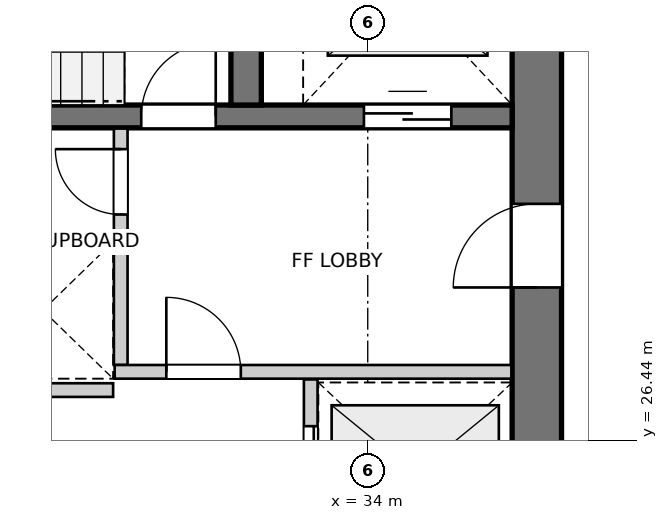
"""IFC4 building model, lengths in metres.
Left out: names, types, materials, properties, quantities, classifications, styles, units other than length and angle.
Written with IfcOpenShell. Run it as: python <this file> out.ifc"""

import sys

from ifc_helpers import new_model, si_unit, direction, frame, frame_2d, origin, place, context, subcontext, project, spatial, rectangle, extrude, source, transform, mapped, element, fill, save


model = new_model("IFC4")
c1 = context("Model", 3, precision=1e-05, world=origin(), true_north=direction((0.0, 1.0)))
c2 = subcontext(c1, "Body", "Model", "MODEL_VIEW")
j1 = project(units=[si_unit("LENGTHUNIT", "METRE"), si_unit("PLANEANGLEUNIT", "RADIAN")], contexts=[c1])
p1 = place(None, origin())
s1 = spatial("IfcSite", under=j1, at=p1, CompositionType="ELEMENT")
p2 = place(p1, origin())
s2 = spatial("IfcBuilding", under=s1, at=p2, CompositionType="ELEMENT")
p3 = place(p2, frame((0.0, 0.0, 80.0)))
s3 = spatial("IfcBuildingStorey", under=s2, at=p3, CompositionType="ELEMENT", Elevation=80.0)
p4 = place(p3, frame((36.225, 18.2, 0.0), z_axis=(0.0, 0.0, 1.0), x_axis=(0.0, 1.0, 0.0)))
e1 = element("IfcWall", 1, at=p4, inside=s3, PredefinedType="SHEAR", context=c2, shape_type="SweptSolid", body=[
    extrude(rectangle(XDim=15.6, YDim=0.65, at=frame_2d((7.8, 0.0))), origin(), (0.0, 0.0, 1.0), 2.935),
])
p5 = place(p4, frame((4.25, 0.0, 0.0)))
e2 = element("IfcOpeningElement", 2, at=p5, cuts=e1, PredefinedType="OPENING", context=c2, shape_type="SweptSolid", body=[
    extrude(rectangle(XDim=1.1, YDim=2.15, at=frame_2d((0.55, 1.075))), frame((0.0, 0.335, 0.0), z_axis=(0.0, -1.0, 0.0), x_axis=(1.0, 0.0, 0.0)), (0.0, 0.0, 1.0), 0.67),
])
p6 = place(p4, frame((10.25, 0.0, 0.0)))
e3 = element("IfcOpeningElement", 3, at=p6, cuts=e1, PredefinedType="OPENING", context=c2, shape_type="SweptSolid", body=[
    extrude(rectangle(XDim=1.1, YDim=2.15, at=frame_2d((0.55, 1.075))), frame((0.0, 0.335, 0.0), z_axis=(0.0, -1.0, 0.0), x_axis=(1.0, 0.0, 0.0)), (0.0, 0.0, 1.0), 0.67),
])
p7 = place(p3, frame((24.8, 30.7, 0.0), z_axis=(0.0, 0.0, 1.0), x_axis=(1.0, 0.0, 0.0)))
e4 = element("IfcWall", 4, at=p7, inside=s3, PredefinedType="SHEAR", context=c2, shape_type="SweptSolid", body=[
    extrude(rectangle(XDim=11.1, YDim=0.3, at=frame_2d((5.55, 0.0))), origin(), (0.0, 0.0, 1.0), 2.935),
])
p8 = place(p7, frame((6.22, 0.0, 0.0)))
e5 = element("IfcOpeningElement", 5, at=p8, cuts=e4, PredefinedType="OPENING", context=c2, shape_type="SweptSolid", body=[
    extrude(rectangle(XDim=0.98, YDim=2.15, at=frame_2d((0.49, 1.075))), frame((0.0, 0.16, 0.0), z_axis=(0.0, -1.0, 0.0), x_axis=(1.0, 0.0, 0.0)), (0.0, 0.0, 1.0), 0.32),
])
p9 = place(p7, frame((9.15, 0.0, 0.0)))
e6 = element("IfcOpeningElement", 6, at=p9, cuts=e4, PredefinedType="OPENING", context=c2, shape_type="SweptSolid", body=[
    extrude(rectangle(XDim=1.15, YDim=2.15, at=frame_2d((0.575, 1.075))), frame((0.0, 0.16, 0.0), z_axis=(0.0, -1.0, 0.0), x_axis=(1.0, 0.0, 0.0)), (0.0, 0.0, 1.0), 0.32),
])
p10 = place(p3, frame((32.4, 30.85, 0.0), z_axis=(0.0, 0.0, 1.0), x_axis=(0.0, 1.0, 0.0)))
e7 = element("IfcWall", 7, at=p10, inside=s3, PredefinedType="SHEAR", context=c2, shape_type="SweptSolid", body=[
    extrude(rectangle(XDim=2.95, YDim=0.4, at=frame_2d((1.475, 0.0))), origin(), (0.0, 0.0, 1.0), 2.935),
])
p11 = place(p3, frame((30.75, 27.43, 0.0), z_axis=(0.0, 0.0, 1.0), x_axis=(0.0, 1.0, 0.0)))
e8 = element("IfcWall", 8, at=p11, inside=s3, PredefinedType="PARTITIONING", context=c2, shape_type="SweptSolid", body=[
    extrude(rectangle(XDim=3.11, YDim=0.18, at=frame_2d((1.555, 0.0))), origin(), (0.0, 0.0, 1.0), 2.935),
])
p12 = place(p11, frame((1.98, 0.0, 0.0)))
e9 = element("IfcOpeningElement", 9, at=p12, cuts=e8, PredefinedType="OPENING", context=c2, shape_type="SweptSolid", body=[
    extrude(rectangle(XDim=0.86, YDim=2.05, at=frame_2d((0.43, 1.025))), frame((0.0, 0.1, 0.0), z_axis=(0.0, -1.0, 0.0), x_axis=(1.0, 0.0, 0.0)), (0.0, 0.0, 1.0), 0.2),
])
p13 = place(p3, frame((30.67, 27.34, 0.0), z_axis=(0.0, 0.0, 1.0), x_axis=(1.0, 0.0, 0.0)))
e10 = element("IfcWall", 10, at=p13, inside=s3, PredefinedType="PARTITIONING", context=c2, shape_type="SweptSolid", body=[
    extrude(rectangle(XDim=5.22, YDim=0.18, at=frame_2d((2.61, 0.0))), origin(), (0.0, 0.0, 1.0), 2.935),
])
p14 = place(p13, frame((0.68, 0.0, 0.0)))
e11 = element("IfcOpeningElement", 11, at=p14, cuts=e10, PredefinedType="OPENING", context=c2, shape_type="SweptSolid", body=[
    extrude(rectangle(XDim=0.98, YDim=2.15, at=frame_2d((0.49, 1.075))), frame((0.0, 0.1, 0.0), z_axis=(0.0, -1.0, 0.0), x_axis=(1.0, 0.0, 0.0)), (0.0, 0.0, 1.0), 0.2),
])
p15 = place(p3, frame((33.25, 24.76, 0.0), z_axis=(0.0, 0.0, 1.0), x_axis=(0.0, 1.0, 0.0)))
e12 = element("IfcWall", 12, at=p15, inside=s3, PredefinedType="PARTITIONING", context=c2, shape_type="SweptSolid", body=[
    extrude(rectangle(XDim=2.48, YDim=0.18, at=frame_2d((1.24, 0.0))), origin(), (0.0, 0.0, 1.0), 2.935),
])
p16 = place(p15, frame((0.615, 0.0, 0.0)))
e13 = element("IfcOpeningElement", 13, at=p16, cuts=e12, PredefinedType="OPENING", context=c2, shape_type="SweptSolid", body=[
    extrude(rectangle(XDim=1.25, YDim=2.15, at=frame_2d((0.625, 1.075))), frame((0.0, 0.1, 0.0), z_axis=(0.0, -1.0, 0.0), x_axis=(1.0, 0.0, 0.0)), (0.0, 0.0, 1.0), 0.2),
])
p17 = place(p3, frame((24.81, 29.08, 0.0), z_axis=(0.0, 0.0, 1.0), x_axis=(1.0, 0.0, 0.0)))
e14 = element("IfcWall", 14, at=p17, inside=s3, PredefinedType="PARTITIONING", context=c2, shape_type="SweptSolid", body=[
    extrude(rectangle(XDim=5.84, YDim=0.18, at=frame_2d((2.92, 0.0))), origin(), (0.0, 0.0, 1.0), 2.935),
])
p18 = place(p3, frame((28.825, 27.1, 0.0), z_axis=(0.0, 0.0, 1.0), x_axis=(1.0, 0.0, 0.0)))
e15 = element("IfcWall", 15, at=p18, inside=s3, PredefinedType="PARTITIONING", context=c2, shape_type="SweptSolid", body=[
    extrude(rectangle(XDim=1.825, YDim=0.18, at=frame_2d((0.913, 0.0))), origin(), (0.0, 0.0, 1.0), 2.935),
])
m1 = source(origin(), c2, "Body", "SweptSolid", [
    extrude(rectangle(XDim=0.98, YDim=2.15, at=frame_2d((0.49, 1.075))), frame((0.0, 0.025, 0.0), z_axis=(0.0, -1.0, 0.0), x_axis=(1.0, 0.0, 0.0)), (0.0, 0.0, 1.0), 0.05),
])
p19 = place(p8, origin())
e16 = element("IfcDoor", 16, at=p19, inside=s3, OperationType="SINGLE_SWING_RIGHT", PredefinedType="DOOR", context=c2, shape_type="MappedRepresentation", body=[
    mapped(m1, transform((0.0, 0.0, 0.0), x_axis=(1.0, 0.0, 0.0), y_axis=(0.0, 1.0, 0.0), z_axis=(0.0, 0.0, 1.0), scale=1.0)),
])
fill(e5, e16)
m2 = source(origin(), c2, "Body", "SweptSolid", [
    extrude(rectangle(XDim=1.15, YDim=2.15, at=frame_2d((0.575, 1.075))), frame((0.0, 0.025, 0.0), z_axis=(0.0, -1.0, 0.0), x_axis=(1.0, 0.0, 0.0)), (0.0, 0.0, 1.0), 0.05),
])
p20 = place(p9, origin())
e17 = element("IfcDoor", 17, at=p20, inside=s3, OperationType="DOUBLE_DOOR_SLIDING", PredefinedType="DOOR", context=c2, shape_type="MappedRepresentation", body=[
    mapped(m2, transform((0.0, 0.0, 0.0), x_axis=(1.0, 0.0, 0.0), y_axis=(0.0, 1.0, 0.0), z_axis=(0.0, 0.0, 1.0), scale=1.0)),
])
fill(e6, e17)
m3 = source(origin(), c2, "Body", "SweptSolid", [
    extrude(rectangle(XDim=1.1, YDim=2.15, at=frame_2d((0.55, 1.075))), frame((0.0, 0.025, 0.0), z_axis=(0.0, -1.0, 0.0), x_axis=(1.0, 0.0, 0.0)), (0.0, 0.0, 1.0), 0.05),
])
p21 = place(p6, origin())
e18 = element("IfcDoor", 18, at=p21, inside=s3, OperationType="SINGLE_SWING_LEFT", PredefinedType="DOOR", context=c2, shape_type="MappedRepresentation", body=[
    mapped(m3, transform((0.0, 0.0, 0.0), x_axis=(1.0, 0.0, 0.0), y_axis=(0.0, 1.0, 0.0), z_axis=(0.0, 0.0, 1.0), scale=1.0)),
])
fill(e3, e18)
m4 = source(origin(), c2, "Body", "SweptSolid", [
    extrude(rectangle(XDim=0.86, YDim=2.05, at=frame_2d((0.43, 1.025))), frame((0.0, 0.025, 0.0), z_axis=(0.0, -1.0, 0.0), x_axis=(1.0, 0.0, 0.0)), (0.0, 0.0, 1.0), 0.05),
])
p22 = place(p12, origin())
e19 = element("IfcDoor", 19, at=p22, inside=s3, OperationType="SINGLE_SWING_RIGHT", PredefinedType="DOOR", context=c2, shape_type="MappedRepresentation", body=[
    mapped(m4, transform((0.0, 0.0, 0.0), x_axis=(1.0, 0.0, 0.0), y_axis=(0.0, 1.0, 0.0), z_axis=(0.0, 0.0, 1.0), scale=1.0)),
])
fill(e9, e19)
p23 = place(p14, origin())
e20 = element("IfcDoor", 20, at=p23, inside=s3, OperationType="SINGLE_SWING_LEFT", PredefinedType="DOOR", context=c2, shape_type="MappedRepresentation", body=[
    mapped(m1, transform((0.0, 0.0, 0.0), x_axis=(1.0, 0.0, 0.0), y_axis=(0.0, 1.0, 0.0), z_axis=(0.0, 0.0, 1.0), scale=1.0)),
])
fill(e11, e20)
m5 = source(origin(), c2, "Body", "SweptSolid", [
    extrude(rectangle(XDim=1.25, YDim=2.15, at=frame_2d((0.625, 1.075))), frame((0.0, 0.025, 0.0), z_axis=(0.0, -1.0, 0.0), x_axis=(1.0, 0.0, 0.0)), (0.0, 0.0, 1.0), 0.05),
])
p24 = place(p16, origin())
e21 = element("IfcDoor", 21, at=p24, inside=s3, OperationType="DOUBLE_DOOR_SLIDING", PredefinedType="DOOR", context=c2, shape_type="MappedRepresentation", body=[
    mapped(m5, transform((0.0, 0.0, 0.0), x_axis=(1.0, 0.0, 0.0), y_axis=(0.0, 1.0, 0.0), z_axis=(0.0, 0.0, 1.0), scale=1.0)),
])
fill(e13, e21)
save(model, sys.argv[1])
